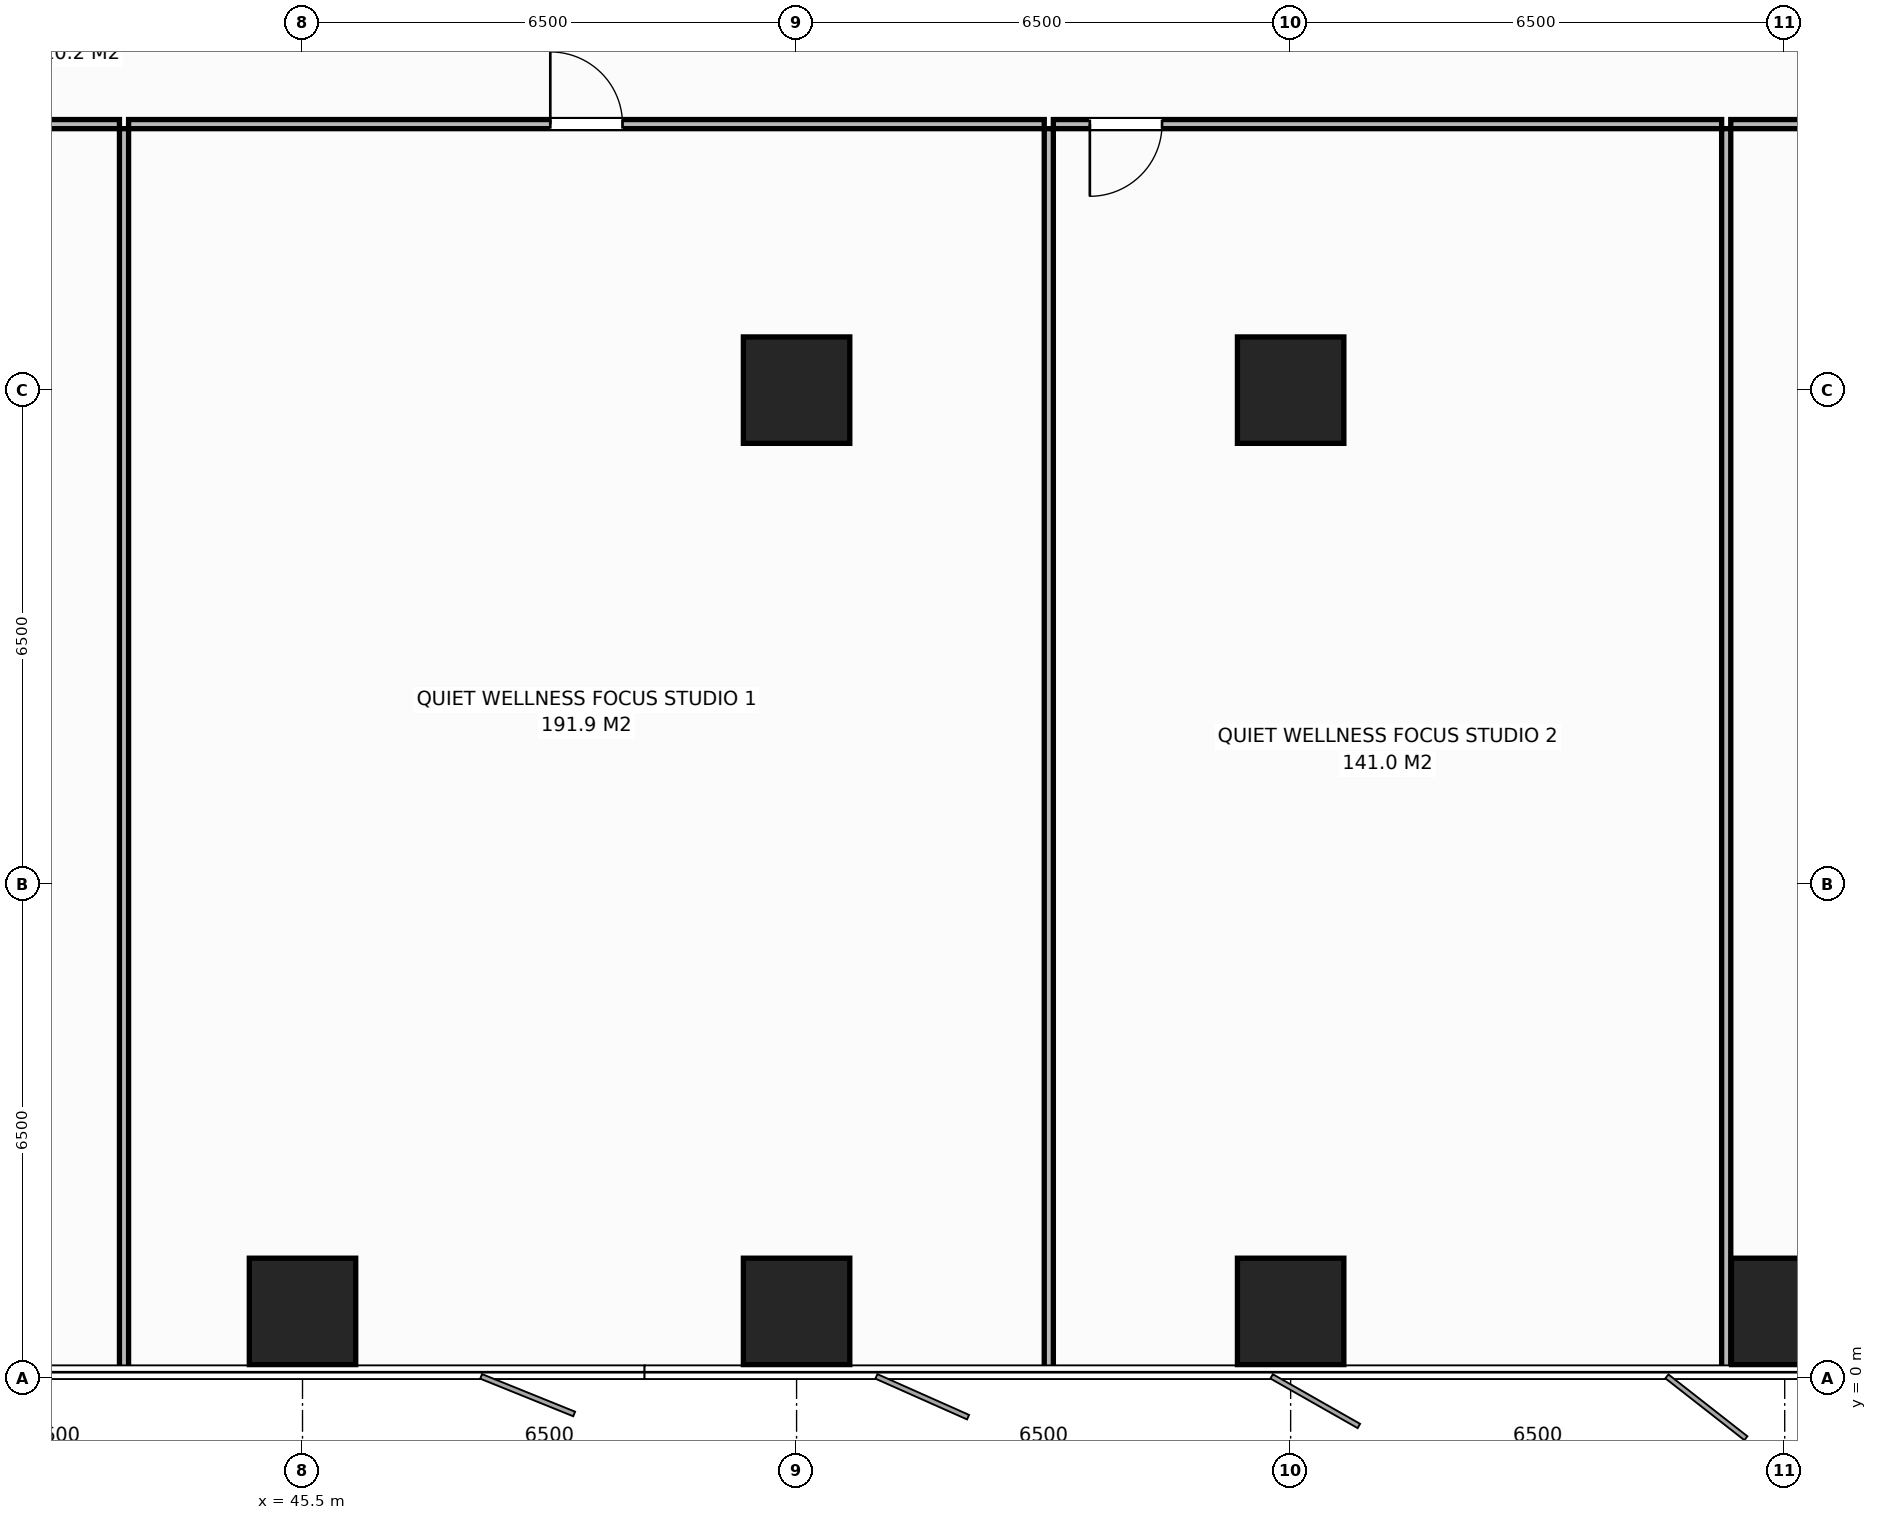
"""IFC4 building model, lengths in metres.
Left out: names, types, materials, properties, quantities, classifications, styles, units other than length and angle.
Written with IfcOpenShell. Run it as: python <this file> out.ifc"""

import sys

from ifc_helpers import new_model, si_unit, direction, frame, frame_2d, origin, origin_2d, place, context, subcontext, project, spatial, rectangle, extrude, element, fill, save


model = new_model("IFC4")
c1 = context("Model", 3, precision=1e-05, world=origin(), true_north=direction((0.0, 1.0)))
c2 = subcontext(c1, "Body", "Model", "MODEL_VIEW")
j1 = project(units=[si_unit("LENGTHUNIT", "METRE"), si_unit("PLANEANGLEUNIT", "RADIAN")], contexts=[c1])
p1 = place(None, origin())
s1 = spatial("IfcSite", under=j1, at=p1, CompositionType="ELEMENT")
p2 = place(p1, origin())
s2 = spatial("IfcBuilding", under=s1, at=p2, CompositionType="ELEMENT")
p3 = place(p2, frame((0.0, 0.0, 77.2)))
s3 = spatial("IfcBuildingStorey", under=s2, at=p3, CompositionType="ELEMENT", Elevation=77.2)
for number, where, z_axis, x_axis in (
    (1, (58.5, 13.0, 0.0), (0.0, 0.0, 1.0), (1.0, 0.0, 0.0)),
    (2, (52.0, 13.0, 0.0), (0.0, 0.0, 1.0), (1.0, 0.0, 0.0)),
    (3, (45.5, 0.88, 0.0), (0.0, 0.0, 1.0), (1.0, 0.0, 0.0)),
    (4, (52.0, 0.88, 0.0), (0.0, 0.0, 1.0), (1.0, 0.0, 0.0)),
    (5, (58.5, 0.88, 0.0), (0.0, 0.0, 1.0), (1.0, 0.0, 0.0)),
    (6, (65.0, 0.88, 0.0), (0.0, 0.0, 1.0), (1.0, 0.0, 0.0)),
):
    element("IfcColumn", number, at=place(p3, frame(where, z_axis=z_axis, x_axis=x_axis)), inside=s3, PredefinedType="COLUMN", context=c2, shape_type="SweptSolid", body=[
        extrude(rectangle(XDim=1.4, YDim=1.4, at=origin_2d()), origin(), (0.0, 0.0, 1.0), 3.8),
    ])
p4 = place(p3, frame((43.152, 0.02, 0.0), z_axis=(0.0, 0.0, 1.0), x_axis=(0.0, 1.0, 0.0)))
e7 = element("IfcWall", 7, at=p4, inside=s3, PredefinedType="PARTITIONING", context=c2, shape_type="SweptSolid", body=[
    extrude(rectangle(XDim=16.42, YDim=0.12, at=frame_2d((8.21, 0.0))), origin(), (0.0, 0.0, 1.0), 3.52),
])
p5 = place(p3, frame((35.931, 16.5, 0.0), z_axis=(0.0, 0.0, 1.0), x_axis=(1.0, 0.0, 0.0)))
e8 = element("IfcWall", 8, at=p5, inside=s3, PredefinedType="PARTITIONING", context=c2, shape_type="SweptSolid", body=[
    extrude(rectangle(XDim=7.161, YDim=0.12, at=frame_2d((3.581, 0.0))), origin(), (0.0, 0.0, 1.0), 3.52),
])
p6 = place(p5, frame((0.48, 0.0, 0.0)))
e9 = element("IfcOpeningElement", 9, at=p6, cuts=e8, PredefinedType="OPENING", context=c2, shape_type="SweptSolid", body=[
    extrude(rectangle(XDim=0.95, YDim=2.15, at=frame_2d((0.475, 1.075))), frame((0.0, 0.07, 0.0), z_axis=(0.0, -1.0, 0.0), x_axis=(1.0, 0.0, 0.0)), (0.0, 0.0, 1.0), 0.14),
])
p7 = place(p3, frame((55.318, 0.02, 0.0), z_axis=(0.0, 0.0, 1.0), x_axis=(0.0, 1.0, 0.0)))
e10 = element("IfcWall", 10, at=p7, inside=s3, PredefinedType="PARTITIONING", context=c2, shape_type="SweptSolid", body=[
    extrude(rectangle(XDim=16.42, YDim=0.12, at=frame_2d((8.21, 0.0))), origin(), (0.0, 0.0, 1.0), 3.52),
])
p8 = place(p3, frame((43.212, 16.5, 0.0), z_axis=(0.0, 0.0, 1.0), x_axis=(1.0, 0.0, 0.0)))
e11 = element("IfcWall", 11, at=p8, inside=s3, PredefinedType="PARTITIONING", context=c2, shape_type="SweptSolid", body=[
    extrude(rectangle(XDim=12.047, YDim=0.12, at=frame_2d((6.023, 0.0))), origin(), (0.0, 0.0, 1.0), 3.52),
])
p9 = place(p8, frame((5.548, 0.0, 0.0)))
e12 = element("IfcOpeningElement", 12, at=p9, cuts=e11, PredefinedType="OPENING", context=c2, shape_type="SweptSolid", body=[
    extrude(rectangle(XDim=0.95, YDim=2.15, at=frame_2d((0.475, 1.075))), frame((0.0, 0.07, 0.0), z_axis=(0.0, -1.0, 0.0), x_axis=(1.0, 0.0, 0.0)), (0.0, 0.0, 1.0), 0.14),
])
p10 = place(p3, frame((64.23, 0.02, 0.0), z_axis=(0.0, 0.0, 1.0), x_axis=(0.0, 1.0, 0.0)))
e13 = element("IfcWall", 13, at=p10, inside=s3, PredefinedType="PARTITIONING", context=c2, shape_type="SweptSolid", body=[
    extrude(rectangle(XDim=16.42, YDim=0.12, at=frame_2d((8.21, 0.0))), origin(), (0.0, 0.0, 1.0), 3.52),
])
p11 = place(p3, frame((55.378, 16.5, 0.0), z_axis=(0.0, 0.0, 1.0), x_axis=(1.0, 0.0, 0.0)))
e14 = element("IfcWall", 14, at=p11, inside=s3, PredefinedType="PARTITIONING", context=c2, shape_type="SweptSolid", body=[
    extrude(rectangle(XDim=8.792, YDim=0.12, at=frame_2d((4.396, 0.0))), origin(), (0.0, 0.0, 1.0), 3.52),
])
p12 = place(p11, frame((0.48, 0.0, 0.0)))
e15 = element("IfcOpeningElement", 15, at=p12, cuts=e14, PredefinedType="OPENING", context=c2, shape_type="SweptSolid", body=[
    extrude(rectangle(XDim=0.95, YDim=2.15, at=frame_2d((0.475, 1.075))), frame((0.0, 0.07, 0.0), z_axis=(0.0, -1.0, 0.0), x_axis=(1.0, 0.0, 0.0)), (0.0, 0.0, 1.0), 0.14),
])
p13 = place(p3, frame((64.29, 16.5, 0.0), z_axis=(0.0, 0.0, 1.0), x_axis=(1.0, 0.0, 0.0)))
e16 = element("IfcWall", 16, at=p13, inside=s3, PredefinedType="PARTITIONING", context=c2, shape_type="SweptSolid", body=[
    extrude(rectangle(XDim=13.73, YDim=0.12, at=frame_2d((6.865, 0.0))), origin(), (0.0, 0.0, 1.0), 3.52),
])
p14 = place(p13, frame((1.88, 0.0, 0.0)))
e17 = element("IfcOpeningElement", 17, at=p14, cuts=e16, PredefinedType="OPENING", context=c2, shape_type="SweptSolid", body=[
    extrude(rectangle(XDim=0.95, YDim=2.15, at=frame_2d((0.475, 1.075))), frame((0.0, 0.07, 0.0), z_axis=(0.0, -1.0, 0.0), x_axis=(1.0, 0.0, 0.0)), (0.0, 0.0, 1.0), 0.14),
])
p15 = place(p9, origin())
e18 = element("IfcDoor", 18, at=p15, inside=s3, OperationType="SINGLE_SWING_LEFT", PredefinedType="DOOR", context=c2, shape_type="SweptSolid", body=[
    extrude(rectangle(XDim=0.95, YDim=2.15, at=frame_2d((0.475, 1.075))), frame((0.0, 0.025, 0.0), z_axis=(0.0, -1.0, 0.0), x_axis=(1.0, 0.0, 0.0)), (0.0, 0.0, 1.0), 0.05),
])
fill(e12, e18)
p16 = place(p12, origin())
e19 = element("IfcDoor", 19, at=p16, inside=s3, OperationType="SINGLE_SWING_RIGHT", PredefinedType="DOOR", context=c2, shape_type="SweptSolid", body=[
    extrude(rectangle(XDim=0.95, YDim=2.15, at=frame_2d((0.475, 1.075))), frame((0.0, 0.025, 0.0), z_axis=(0.0, -1.0, 0.0), x_axis=(1.0, 0.0, 0.0)), (0.0, 0.0, 1.0), 0.05),
])
fill(e15, e19)
save(model, sys.argv[1])
